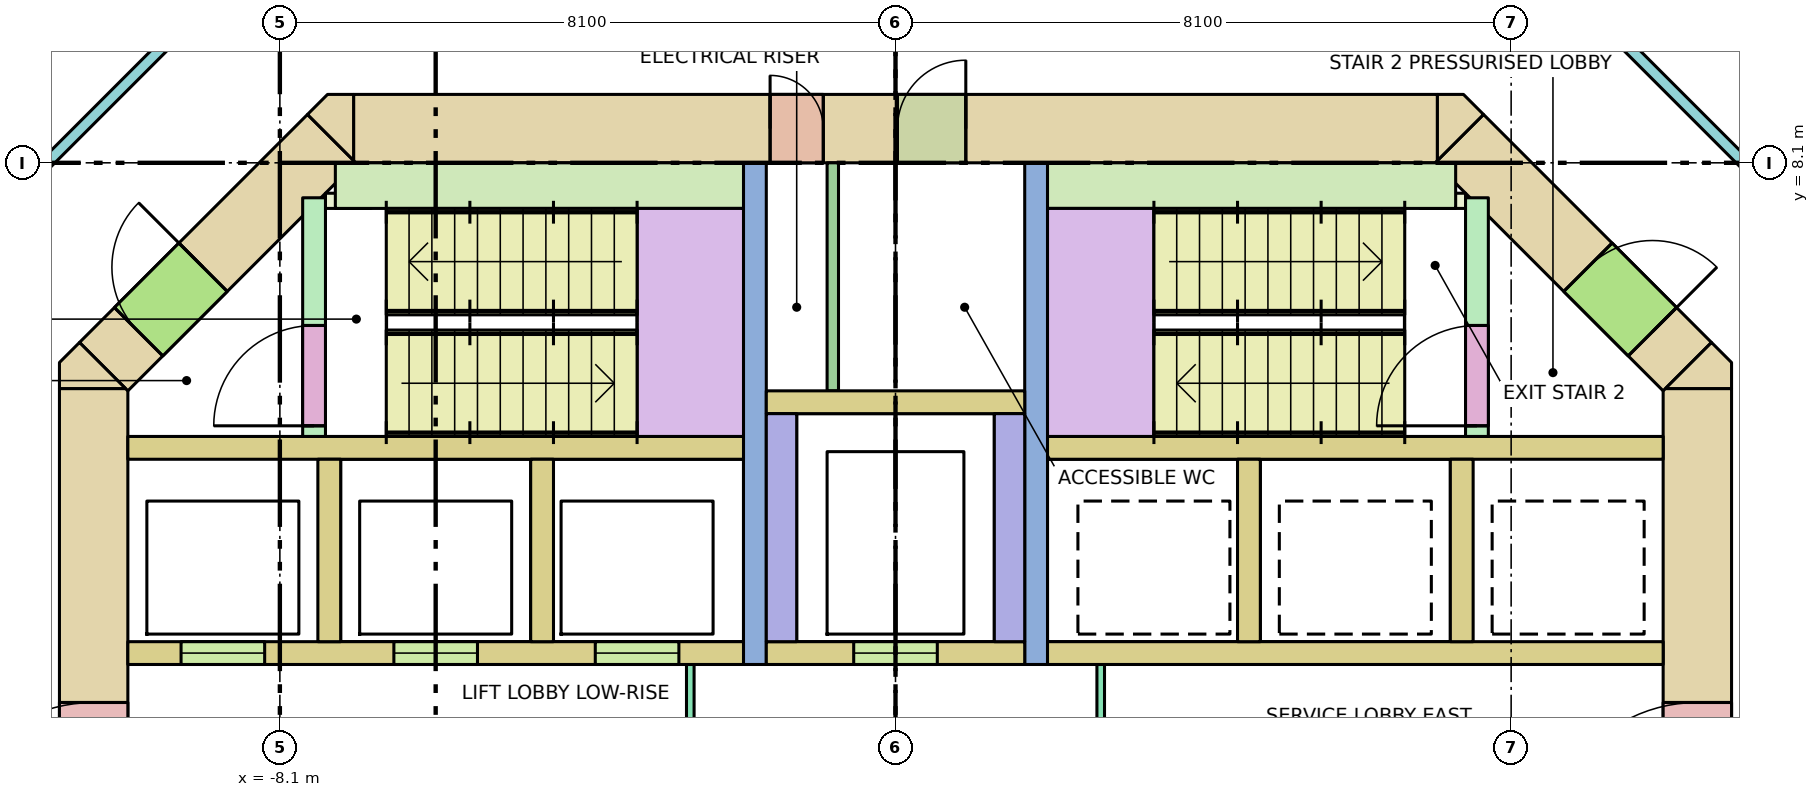
"""IFC4 building model, lengths in metres.
Left out: names, types, materials, properties, quantities, classifications, styles, units other than length and angle.
Written with IfcOpenShell. Run it as: python <this file> out.ifc"""

import sys

from ifc_helpers import new_model, si_unit, direction, frame, frame_2d, origin, place, context, subcontext, project, spatial, polyline, rectangle, outline, extrude, element, fill, save


model = new_model("IFC4")
c1 = context("Model", 3, precision=1e-05, world=origin(), true_north=direction((0.0, 1.0)))
c2 = subcontext(c1, "Body", "Model", "MODEL_VIEW")
j1 = project(units=[si_unit("LENGTHUNIT", "METRE"), si_unit("PLANEANGLEUNIT", "RADIAN")], contexts=[c1])
p1 = place(None, origin())
s1 = spatial("IfcSite", under=j1, at=p1, CompositionType="ELEMENT")
p2 = place(p1, origin())
s2 = spatial("IfcBuilding", under=s1, at=p2, CompositionType="ELEMENT")
p3 = place(p2, frame((0.0, 0.0, 59.0)))
s3 = spatial("IfcBuildingStorey", under=s2, at=p3, CompositionType="ELEMENT", Elevation=59.0)
p4 = place(p3, frame((-7.13, 8.55, -0.28), z_axis=(0.0, 0.0, 1.0), x_axis=(1.0, 0.0, 0.0)))
e1 = element("IfcWall", 1, at=p4, inside=s3, PredefinedType="SHEAR", context=c2, shape_type="SweptSolid", body=[
    extrude(rectangle(XDim=14.26, YDim=0.9, at=frame_2d((7.13, 0.0))), origin(), (0.0, 0.0, 1.0), 4.0),
])
p5 = place(p4, frame((5.48, 0.0, 0.28)))
e2 = element("IfcOpeningElement", 2, at=p5, cuts=e1, PredefinedType="OPENING", context=c2, shape_type="SweptSolid", body=[
    extrude(rectangle(XDim=0.7, YDim=2.1, at=frame_2d((0.35, 1.05))), frame((0.0, 0.46, 0.0), z_axis=(0.0, -1.0, 0.0), x_axis=(1.0, 0.0, 0.0)), (0.0, 0.0, 1.0), 0.92),
])
p6 = place(p4, frame((7.155, 0.0, 0.28)))
e3 = element("IfcOpeningElement", 3, at=p6, cuts=e1, PredefinedType="OPENING", context=c2, shape_type="SweptSolid", body=[
    extrude(rectangle(XDim=0.9, YDim=2.1, at=frame_2d((0.45, 1.05))), frame((0.0, 0.46, 0.0), z_axis=(0.0, -1.0, 0.0), x_axis=(1.0, 0.0, 0.0)), (0.0, 0.0, 1.0), 0.92),
])
p7 = place(p3, frame((-10.55, -5.13, -0.28), z_axis=(0.0, 0.0, 1.0), x_axis=(0.0, 1.0, 0.0)))
e4 = element("IfcWall", 4, at=p7, inside=s3, PredefinedType="SHEAR", context=c2, shape_type="SweptSolid", body=[
    extrude(rectangle(XDim=10.26, YDim=0.9, at=frame_2d((5.13, 0.0))), origin(), (0.0, 0.0, 1.0), 4.0),
])
p8 = place(p7, frame((4.13, 0.0, 0.28)))
e5 = element("IfcOpeningElement", 5, at=p8, cuts=e4, PredefinedType="OPENING", context=c2, shape_type="SweptSolid", body=[
    extrude(rectangle(XDim=2.0, YDim=2.1, at=frame_2d((1.0, 1.05))), frame((0.0, 0.46, 0.0), z_axis=(0.0, -1.0, 0.0), x_axis=(1.0, 0.0, 0.0)), (0.0, 0.0, 1.0), 0.92),
])
p9 = place(p3, frame((10.55, -5.13, -0.28), z_axis=(0.0, 0.0, 1.0), x_axis=(0.0, 1.0, 0.0)))
e6 = element("IfcWall", 6, at=p9, inside=s3, PredefinedType="SHEAR", context=c2, shape_type="SweptSolid", body=[
    extrude(rectangle(XDim=10.26, YDim=0.9, at=frame_2d((5.13, 0.0))), origin(), (0.0, 0.0, 1.0), 4.0),
])
p10 = place(p9, frame((4.13, 0.0, 0.28)))
e7 = element("IfcOpeningElement", 7, at=p10, cuts=e6, PredefinedType="OPENING", context=c2, shape_type="SweptSolid", body=[
    extrude(rectangle(XDim=2.0, YDim=2.1, at=frame_2d((1.0, 1.05))), frame((0.0, 0.46, 0.0), z_axis=(0.0, -1.0, 0.0), x_axis=(1.0, 0.0, 0.0)), (0.0, 0.0, 1.0), 0.92),
])
p11 = place(p3, frame((-10.418, 5.418, -0.28), z_axis=(0.0, 0.0, 1.0), x_axis=(0.707106781187, 0.707106781187, 0.0)))
e8 = element("IfcWall", 8, at=p11, inside=s3, PredefinedType="SHEAR", context=c2, shape_type="SweptSolid", body=[
    extrude(rectangle(XDim=4.243, YDim=0.9, at=frame_2d((2.121, 0.0))), origin(), (0.0, 0.0, 1.0), 4.0),
])
p12 = place(p11, frame((0.65, 0.0, 0.28)))
e9 = element("IfcOpeningElement", 9, at=p12, cuts=e8, PredefinedType="OPENING", context=c2, shape_type="SweptSolid", body=[
    extrude(rectangle(XDim=1.2, YDim=2.1, at=frame_2d((0.6, 1.05))), frame((0.0, 0.46, 0.0), z_axis=(0.0, -1.0, 0.0), x_axis=(1.0, 0.0, 0.0)), (0.0, 0.0, 1.0), 0.92),
])
p13 = place(p3, frame((7.418, 8.418, -0.28), z_axis=(0.0, 0.0, 1.0), x_axis=(0.707106781187, -0.707106781187, 0.0)))
e10 = element("IfcWall", 10, at=p13, inside=s3, PredefinedType="SHEAR", context=c2, shape_type="SweptSolid", body=[
    extrude(rectangle(XDim=4.243, YDim=0.9, at=frame_2d((2.121, 0.0))), origin(), (0.0, 0.0, 1.0), 4.0),
])
p14 = place(p13, frame((2.393, 0.0, 0.28)))
e11 = element("IfcOpeningElement", 11, at=p14, cuts=e10, PredefinedType="OPENING", context=c2, shape_type="SweptSolid", body=[
    extrude(rectangle(XDim=1.2, YDim=2.1, at=frame_2d((0.6, 1.05))), frame((0.0, 0.46, 0.0), z_axis=(0.0, -1.0, 0.0), x_axis=(1.0, 0.0, 0.0)), (0.0, 0.0, 1.0), 0.92),
])
p15 = place(p3, frame((0.0, 0.0, -0.28)))
e12 = element("IfcWall", 12, at=p15, inside=s3, PredefinedType="SHEAR", context=c2, shape_type="SweptSolid", body=[
    extrude(outline(polyline([(-10.736, 5.736), (-10.13, 5.13), (-11.0, 5.13), (-11.0, 5.473), (-10.736, 5.736)])), origin(), (0.0, 0.0, 1.0), 4.0),
])
p16 = place(p3, frame((0.0, 0.0, -0.28)))
e13 = element("IfcWall", 13, at=p16, inside=s3, PredefinedType="SHEAR", context=c2, shape_type="SweptSolid", body=[
    extrude(outline(polyline([(11.0, 5.473), (11.0, 5.13), (10.13, 5.13), (10.736, 5.736), (11.0, 5.473)])), origin(), (0.0, 0.0, 1.0), 4.0),
])
p17 = place(p3, frame((0.0, 0.0, -0.28)))
e14 = element("IfcWall", 14, at=p17, inside=s3, PredefinedType="SHEAR", context=c2, shape_type="SweptSolid", body=[
    extrude(outline(polyline([(-7.473, 9.0), (-7.13, 9.0), (-7.13, 8.13), (-7.736, 8.736), (-7.473, 9.0)])), origin(), (0.0, 0.0, 1.0), 4.0),
])
p18 = place(p3, frame((0.0, 0.0, -0.28)))
e15 = element("IfcWall", 15, at=p18, inside=s3, PredefinedType="SHEAR", context=c2, shape_type="SweptSolid", body=[
    extrude(outline(polyline([(7.473, 9.0), (7.736, 8.736), (7.13, 8.13), (7.13, 9.0), (7.473, 9.0)])), origin(), (0.0, 0.0, 1.0), 4.0),
])
for number, where, z_axis, x_axis in (
    (16, (-10.1, 4.35, 0.0), (0.0, 0.0, 1.0), (1.0, 0.0, 0.0)),
    (17, (2.0, 4.35, 0.0), (0.0, 0.0, 1.0), (1.0, 0.0, 0.0)),
):
    element("IfcWall", number, at=place(p3, frame(where, z_axis=z_axis, x_axis=x_axis)), inside=s3, PredefinedType="SOLIDWALL", context=c2, shape_type="SweptSolid", body=[
        extrude(rectangle(XDim=8.1, YDim=0.3, at=frame_2d((4.05, 0.0))), origin(), (0.0, 0.0, 1.0), 3.72),
    ])
p19 = place(p3, frame((-10.1, 1.65, 0.0), z_axis=(0.0, 0.0, 1.0), x_axis=(1.0, 0.0, 0.0)))
e18 = element("IfcWall", 18, at=p19, inside=s3, PredefinedType="SOLIDWALL", context=c2, shape_type="SweptSolid", body=[
    extrude(rectangle(XDim=8.1, YDim=0.3, at=frame_2d((4.05, 0.0))), origin(), (0.0, 0.0, 1.0), 3.72),
])
p20 = place(p19, frame((0.7, 0.0, 0.0)))
e19 = element("IfcOpeningElement", 19, at=p20, cuts=e18, PredefinedType="OPENING", context=c2, shape_type="SweptSolid", body=[
    extrude(rectangle(XDim=1.1, YDim=2.1, at=frame_2d((0.55, 1.05))), frame((0.0, 0.16, 0.0), z_axis=(0.0, -1.0, 0.0), x_axis=(1.0, 0.0, 0.0)), (0.0, 0.0, 1.0), 0.32),
])
p21 = place(p19, frame((3.5, 0.0, 0.0)))
e20 = element("IfcOpeningElement", 20, at=p21, cuts=e18, PredefinedType="OPENING", context=c2, shape_type="SweptSolid", body=[
    extrude(rectangle(XDim=1.1, YDim=2.1, at=frame_2d((0.55, 1.05))), frame((0.0, 0.16, 0.0), z_axis=(0.0, -1.0, 0.0), x_axis=(1.0, 0.0, 0.0)), (0.0, 0.0, 1.0), 0.32),
])
p22 = place(p19, frame((6.15, 0.0, 0.0)))
e21 = element("IfcOpeningElement", 21, at=p22, cuts=e18, PredefinedType="OPENING", context=c2, shape_type="SweptSolid", body=[
    extrude(rectangle(XDim=1.1, YDim=2.1, at=frame_2d((0.55, 1.05))), frame((0.0, 0.16, 0.0), z_axis=(0.0, -1.0, 0.0), x_axis=(1.0, 0.0, 0.0)), (0.0, 0.0, 1.0), 0.32),
])
p23 = place(p3, frame((2.0, 1.65, 0.0), z_axis=(0.0, 0.0, 1.0), x_axis=(1.0, 0.0, 0.0)))
e22 = element("IfcWall", 22, at=p23, inside=s3, PredefinedType="SOLIDWALL", context=c2, shape_type="SweptSolid", body=[
    extrude(rectangle(XDim=8.1, YDim=0.3, at=frame_2d((4.05, 0.0))), origin(), (0.0, 0.0, 1.0), 3.72),
])
for number, where, z_axis, x_axis in (
    (23, (-7.45, 1.8, 0.0), (0.0, 0.0, 1.0), (0.0, 1.0, 0.0)),
    (24, (-4.65, 1.8, 0.0), (0.0, 0.0, 1.0), (0.0, 1.0, 0.0)),
    (25, (4.65, 1.8, 0.0), (0.0, 0.0, 1.0), (0.0, 1.0, 0.0)),
    (26, (7.45, 1.8, 0.0), (0.0, 0.0, 1.0), (0.0, 1.0, 0.0)),
):
    element("IfcWall", number, at=place(p3, frame(where, z_axis=z_axis, x_axis=x_axis)), inside=s3, PredefinedType="SOLIDWALL", context=c2, shape_type="SweptSolid", body=[
        extrude(rectangle(XDim=2.4, YDim=0.3, at=frame_2d((1.2, 0.0))), origin(), (0.0, 0.0, 1.0), 3.72),
    ])
for number, where, z_axis, x_axis in (
    (27, (-1.85, 1.5, 0.0), (0.0, 0.0, 1.0), (0.0, 1.0, 0.0)),
    (28, (1.85, 1.5, 0.0), (0.0, 0.0, 1.0), (0.0, 1.0, 0.0)),
):
    element("IfcWall", number, at=place(p3, frame(where, z_axis=z_axis, x_axis=x_axis)), inside=s3, PredefinedType="SHEAR", context=c2, shape_type="SweptSolid", body=[
        extrude(rectangle(XDim=6.6, YDim=0.3, at=frame_2d((3.3, 0.0))), origin(), (0.0, 0.0, 1.0), 3.72),
    ])
p24 = place(p3, frame((-1.7, 1.65, 0.0), z_axis=(0.0, 0.0, 1.0), x_axis=(1.0, 0.0, 0.0)))
e29 = element("IfcWall", 29, at=p24, inside=s3, PredefinedType="SOLIDWALL", context=c2, shape_type="SweptSolid", body=[
    extrude(rectangle(XDim=3.4, YDim=0.3, at=frame_2d((1.7, 0.0))), origin(), (0.0, 0.0, 1.0), 3.72),
])
p25 = place(p24, frame((1.15, 0.0, 0.0)))
e30 = element("IfcOpeningElement", 30, at=p25, cuts=e29, PredefinedType="OPENING", context=c2, shape_type="SweptSolid", body=[
    extrude(rectangle(XDim=1.1, YDim=2.1, at=frame_2d((0.55, 1.05))), frame((0.0, 0.16, 0.0), z_axis=(0.0, -1.0, 0.0), x_axis=(1.0, 0.0, 0.0)), (0.0, 0.0, 1.0), 0.32),
])
for number, where, z_axis, x_axis in (
    (31, (-1.5, 1.8, 0.0), (0.0, 0.0, 1.0), (0.0, 1.0, 0.0)),
    (32, (1.5, 1.8, 0.0), (0.0, 0.0, 1.0), (0.0, 1.0, 0.0)),
):
    element("IfcWall", number, at=place(p3, frame(where, z_axis=z_axis, x_axis=x_axis)), inside=s3, PredefinedType="SOLIDWALL", context=c2, shape_type="SweptSolid", body=[
        extrude(rectangle(XDim=3.0, YDim=0.4, at=frame_2d((1.5, 0.0))), origin(), (0.0, 0.0, 1.0), 3.72),
    ])
p26 = place(p3, frame((-1.7, 4.95, 0.0), z_axis=(0.0, 0.0, 1.0), x_axis=(1.0, 0.0, 0.0)))
e33 = element("IfcWall", 33, at=p26, inside=s3, PredefinedType="SOLIDWALL", context=c2, shape_type="SweptSolid", body=[
    extrude(rectangle(XDim=3.4, YDim=0.3, at=frame_2d((1.7, 0.0))), origin(), (0.0, 0.0, 1.0), 3.72),
])
p27 = place(p3, frame((-7.65, 4.5, 0.0), z_axis=(0.0, 0.0, 1.0), x_axis=(0.0, 1.0, 0.0)))
e34 = element("IfcWall", 34, at=p27, inside=s3, PredefinedType="SHEAR", context=c2, shape_type="SweptSolid", body=[
    extrude(rectangle(XDim=3.14, YDim=0.3, at=frame_2d((1.57, 0.0))), origin(), (0.0, 0.0, 1.0), 3.72),
])
p28 = place(p27, frame((0.14, 0.0, 0.0)))
e35 = element("IfcOpeningElement", 35, at=p28, cuts=e34, PredefinedType="OPENING", context=c2, shape_type="SweptSolid", body=[
    extrude(rectangle(XDim=1.32, YDim=2.1, at=frame_2d((0.66, 1.05))), frame((0.0, 0.16, 0.0), z_axis=(0.0, -1.0, 0.0), x_axis=(1.0, 0.0, 0.0)), (0.0, 0.0, 1.0), 0.32),
])
p29 = place(p3, frame((-7.37, 7.8, 0.0), z_axis=(0.0, 0.0, 1.0), x_axis=(1.0, 0.0, 0.0)))
e36 = element("IfcWall", 36, at=p29, inside=s3, PredefinedType="SHEAR", context=c2, shape_type="SweptSolid", body=[
    extrude(rectangle(XDim=5.37, YDim=0.6, at=frame_2d((2.685, 0.0))), origin(), (0.0, 0.0, 1.0), 3.72),
])
p30 = place(p3, frame((7.65, 4.5, 0.0), z_axis=(0.0, 0.0, 1.0), x_axis=(0.0, 1.0, 0.0)))
e37 = element("IfcWall", 37, at=p30, inside=s3, PredefinedType="SHEAR", context=c2, shape_type="SweptSolid", body=[
    extrude(rectangle(XDim=3.14, YDim=0.3, at=frame_2d((1.57, 0.0))), origin(), (0.0, 0.0, 1.0), 3.72),
])
p31 = place(p30, frame((0.14, 0.0, 0.0)))
e38 = element("IfcOpeningElement", 38, at=p31, cuts=e37, PredefinedType="OPENING", context=c2, shape_type="SweptSolid", body=[
    extrude(rectangle(XDim=1.32, YDim=2.1, at=frame_2d((0.66, 1.05))), frame((0.0, 0.16, 0.0), z_axis=(0.0, -1.0, 0.0), x_axis=(1.0, 0.0, 0.0)), (0.0, 0.0, 1.0), 0.32),
])
p32 = place(p3, frame((2.0, 7.8, 0.0), z_axis=(0.0, 0.0, 1.0), x_axis=(1.0, 0.0, 0.0)))
e39 = element("IfcWall", 39, at=p32, inside=s3, PredefinedType="SHEAR", context=c2, shape_type="SweptSolid", body=[
    extrude(rectangle(XDim=5.37, YDim=0.6, at=frame_2d((2.685, 0.0))), origin(), (0.0, 0.0, 1.0), 3.72),
])
for number, where, z_axis, x_axis in (
    (40, (-7.5, 7.6, 0.0), (0.0, 0.0, 1.0), (1.0, 0.0, 0.0)),
    (41, (6.9, 7.6, 0.0), (0.0, 0.0, 1.0), (1.0, 0.0, 0.0)),
):
    element("IfcWall", number, at=place(p3, frame(where, z_axis=z_axis, x_axis=x_axis)), inside=s3, PredefinedType="SHEAR", context=c2, shape_type="SweptSolid", body=[
        extrude(rectangle(XDim=0.6, YDim=0.2, at=frame_2d((0.3, 0.0))), origin(), (0.0, 0.0, 1.0), 3.72),
    ])
p33 = place(p3, frame((-2.7, -1.5, 0.0), z_axis=(0.0, 0.0, 1.0), x_axis=(0.0, 1.0, 0.0)))
e42 = element("IfcWall", 42, at=p33, inside=s3, PredefinedType="PARTITIONING", context=c2, shape_type="SweptSolid", body=[
    extrude(rectangle(XDim=3.0, YDim=0.1, at=frame_2d((1.5, 0.0))), origin(), (0.0, 0.0, 1.0), 3.72),
])
p34 = place(p33, frame((0.9, 0.0, 0.0)))
e43 = element("IfcOpeningElement", 43, at=p34, cuts=e42, PredefinedType="OPENING", context=c2, shape_type="SweptSolid", body=[
    extrude(rectangle(XDim=1.2, YDim=2.1, at=frame_2d((0.6, 1.05))), frame((0.0, 0.06, 0.0), z_axis=(0.0, -1.0, 0.0), x_axis=(1.0, 0.0, 0.0)), (0.0, 0.0, 1.0), 0.12),
])
p35 = place(p3, frame((2.7, -1.5, 0.0), z_axis=(0.0, 0.0, 1.0), x_axis=(0.0, 1.0, 0.0)))
e44 = element("IfcWall", 44, at=p35, inside=s3, PredefinedType="PARTITIONING", context=c2, shape_type="SweptSolid", body=[
    extrude(rectangle(XDim=3.0, YDim=0.1, at=frame_2d((1.5, 0.0))), origin(), (0.0, 0.0, 1.0), 3.72),
])
p36 = place(p35, frame((0.9, 0.0, 0.0)))
e45 = element("IfcOpeningElement", 45, at=p36, cuts=e44, PredefinedType="OPENING", context=c2, shape_type="SweptSolid", body=[
    extrude(rectangle(XDim=1.2, YDim=2.1, at=frame_2d((0.6, 1.05))), frame((0.0, 0.06, 0.0), z_axis=(0.0, -1.0, 0.0), x_axis=(1.0, 0.0, 0.0)), (0.0, 0.0, 1.0), 0.12),
])
p37 = place(p3, frame((-0.825, 5.1, 0.0), z_axis=(0.0, 0.0, 1.0), x_axis=(0.0, 1.0, 0.0)))
e46 = element("IfcWall", 46, at=p37, inside=s3, PredefinedType="PARTITIONING", context=c2, shape_type="SweptSolid", body=[
    extrude(rectangle(XDim=3.0, YDim=0.15, at=frame_2d((1.5, 0.0))), origin(), (0.0, 0.0, 1.0), 3.72),
])
for number, where, z_axis, x_axis in (
    (47, (-12.938, 6.328, 0.0), (0.0, 0.0, 1.0), (0.707, 0.707, 0.0)),
    (48, (8.328, 10.938, 0.0), (0.0, 0.0, 1.0), (0.707, -0.707, 0.0)),
):
    element("IfcWall", number, at=place(p3, frame(where, z_axis=z_axis, x_axis=x_axis)), inside=s3, PredefinedType="PARTITIONING", context=c2, shape_type="SweptSolid", body=[
        extrude(rectangle(XDim=6.572, YDim=0.15, at=frame_2d((3.286, 0.0))), origin(), (0.0, 0.0, 1.0), 2.82),
    ])
p38 = place(p20, origin())
e49 = element("IfcDoor", 49, at=p38, inside=s3, OperationType="DOUBLE_DOOR_SLIDING", PredefinedType="DOOR", context=c2, shape_type="SweptSolid", body=[
    extrude(rectangle(XDim=1.1, YDim=2.1, at=frame_2d((0.55, 1.05))), frame((0.0, 0.025, 0.0), z_axis=(0.0, -1.0, 0.0), x_axis=(1.0, 0.0, 0.0)), (0.0, 0.0, 1.0), 0.05),
])
fill(e19, e49)
p39 = place(p21, origin())
e50 = element("IfcDoor", 50, at=p39, inside=s3, OperationType="DOUBLE_DOOR_SLIDING", PredefinedType="DOOR", context=c2, shape_type="SweptSolid", body=[
    extrude(rectangle(XDim=1.1, YDim=2.1, at=frame_2d((0.55, 1.05))), frame((0.0, 0.025, 0.0), z_axis=(0.0, -1.0, 0.0), x_axis=(1.0, 0.0, 0.0)), (0.0, 0.0, 1.0), 0.05),
])
fill(e20, e50)
p40 = place(p22, origin())
e51 = element("IfcDoor", 51, at=p40, inside=s3, OperationType="DOUBLE_DOOR_SLIDING", PredefinedType="DOOR", context=c2, shape_type="SweptSolid", body=[
    extrude(rectangle(XDim=1.1, YDim=2.1, at=frame_2d((0.55, 1.05))), frame((0.0, 0.025, 0.0), z_axis=(0.0, -1.0, 0.0), x_axis=(1.0, 0.0, 0.0)), (0.0, 0.0, 1.0), 0.05),
])
fill(e21, e51)
p41 = place(p25, origin())
e52 = element("IfcDoor", 52, at=p41, inside=s3, OperationType="DOUBLE_DOOR_SLIDING", PredefinedType="DOOR", context=c2, shape_type="SweptSolid", body=[
    extrude(rectangle(XDim=1.1, YDim=2.1, at=frame_2d((0.55, 1.05))), frame((0.0, 0.025, 0.0), z_axis=(0.0, -1.0, 0.0), x_axis=(1.0, 0.0, 0.0)), (0.0, 0.0, 1.0), 0.05),
])
fill(e30, e52)
p42 = place(p28, origin())
e53 = element("IfcDoor", 53, at=p42, inside=s3, OperationType="DOUBLE_DOOR_SINGLE_SWING", PredefinedType="DOOR", context=c2, shape_type="SweptSolid", body=[
    extrude(rectangle(XDim=1.32, YDim=2.1, at=frame_2d((0.66, 1.05))), frame((0.0, 0.025, 0.0), z_axis=(0.0, -1.0, 0.0), x_axis=(1.0, 0.0, 0.0)), (0.0, 0.0, 1.0), 0.05),
])
fill(e35, e53)
p43 = place(p12, origin())
e54 = element("IfcDoor", 54, at=p43, inside=s3, OperationType="SINGLE_SWING_RIGHT", PredefinedType="DOOR", context=c2, shape_type="SweptSolid", body=[
    extrude(rectangle(XDim=1.2, YDim=2.1, at=frame_2d((0.6, 1.05))), frame((0.0, 0.025, 0.0), z_axis=(0.0, -1.0, 0.0), x_axis=(1.0, 0.0, 0.0)), (0.0, 0.0, 1.0), 0.05),
])
fill(e9, e54)
p44 = place(p31, origin())
e55 = element("IfcDoor", 55, at=p44, inside=s3, OperationType="DOUBLE_DOOR_SINGLE_SWING", PredefinedType="DOOR", context=c2, shape_type="SweptSolid", body=[
    extrude(rectangle(XDim=1.32, YDim=2.1, at=frame_2d((0.66, 1.05))), frame((0.0, 0.025, 0.0), z_axis=(0.0, -1.0, 0.0), x_axis=(1.0, 0.0, 0.0)), (0.0, 0.0, 1.0), 0.05),
])
fill(e38, e55)
p45 = place(p14, origin())
e56 = element("IfcDoor", 56, at=p45, inside=s3, OperationType="SINGLE_SWING_RIGHT", PredefinedType="DOOR", context=c2, shape_type="SweptSolid", body=[
    extrude(rectangle(XDim=1.2, YDim=2.1, at=frame_2d((0.6, 1.05))), frame((0.0, 0.025, 0.0), z_axis=(0.0, -1.0, 0.0), x_axis=(1.0, 0.0, 0.0)), (0.0, 0.0, 1.0), 0.05),
])
fill(e11, e56)
p46 = place(p8, origin())
e57 = element("IfcDoor", 57, at=p46, inside=s3, OperationType="DOUBLE_DOOR_SINGLE_SWING", PredefinedType="DOOR", context=c2, shape_type="SweptSolid", body=[
    extrude(rectangle(XDim=2.0, YDim=2.1, at=frame_2d((1.0, 1.05))), frame((0.0, 0.025, 0.0), z_axis=(0.0, -1.0, 0.0), x_axis=(1.0, 0.0, 0.0)), (0.0, 0.0, 1.0), 0.05),
])
fill(e5, e57)
p47 = place(p10, origin())
e58 = element("IfcDoor", 58, at=p47, inside=s3, OperationType="DOUBLE_DOOR_SINGLE_SWING", PredefinedType="DOOR", context=c2, shape_type="SweptSolid", body=[
    extrude(rectangle(XDim=2.0, YDim=2.1, at=frame_2d((1.0, 1.05))), frame((0.0, 0.025, 0.0), z_axis=(0.0, -1.0, 0.0), x_axis=(1.0, 0.0, 0.0)), (0.0, 0.0, 1.0), 0.05),
])
fill(e7, e58)
p48 = place(p5, origin())
e59 = element("IfcDoor", 59, at=p48, inside=s3, OperationType="SINGLE_SWING_LEFT", PredefinedType="DOOR", context=c2, shape_type="SweptSolid", body=[
    extrude(rectangle(XDim=0.7, YDim=2.1, at=frame_2d((0.35, 1.05))), frame((0.0, 0.025, 0.0), z_axis=(0.0, -1.0, 0.0), x_axis=(1.0, 0.0, 0.0)), (0.0, 0.0, 1.0), 0.05),
])
fill(e2, e59)
p49 = place(p6, origin())
e60 = element("IfcDoor", 60, at=p49, inside=s3, OperationType="SINGLE_SWING_RIGHT", PredefinedType="DOOR", context=c2, shape_type="SweptSolid", body=[
    extrude(rectangle(XDim=0.9, YDim=2.1, at=frame_2d((0.45, 1.05))), frame((0.0, 0.025, 0.0), z_axis=(0.0, -1.0, 0.0), x_axis=(1.0, 0.0, 0.0)), (0.0, 0.0, 1.0), 0.05),
])
fill(e3, e60)
save(model, sys.argv[1])
